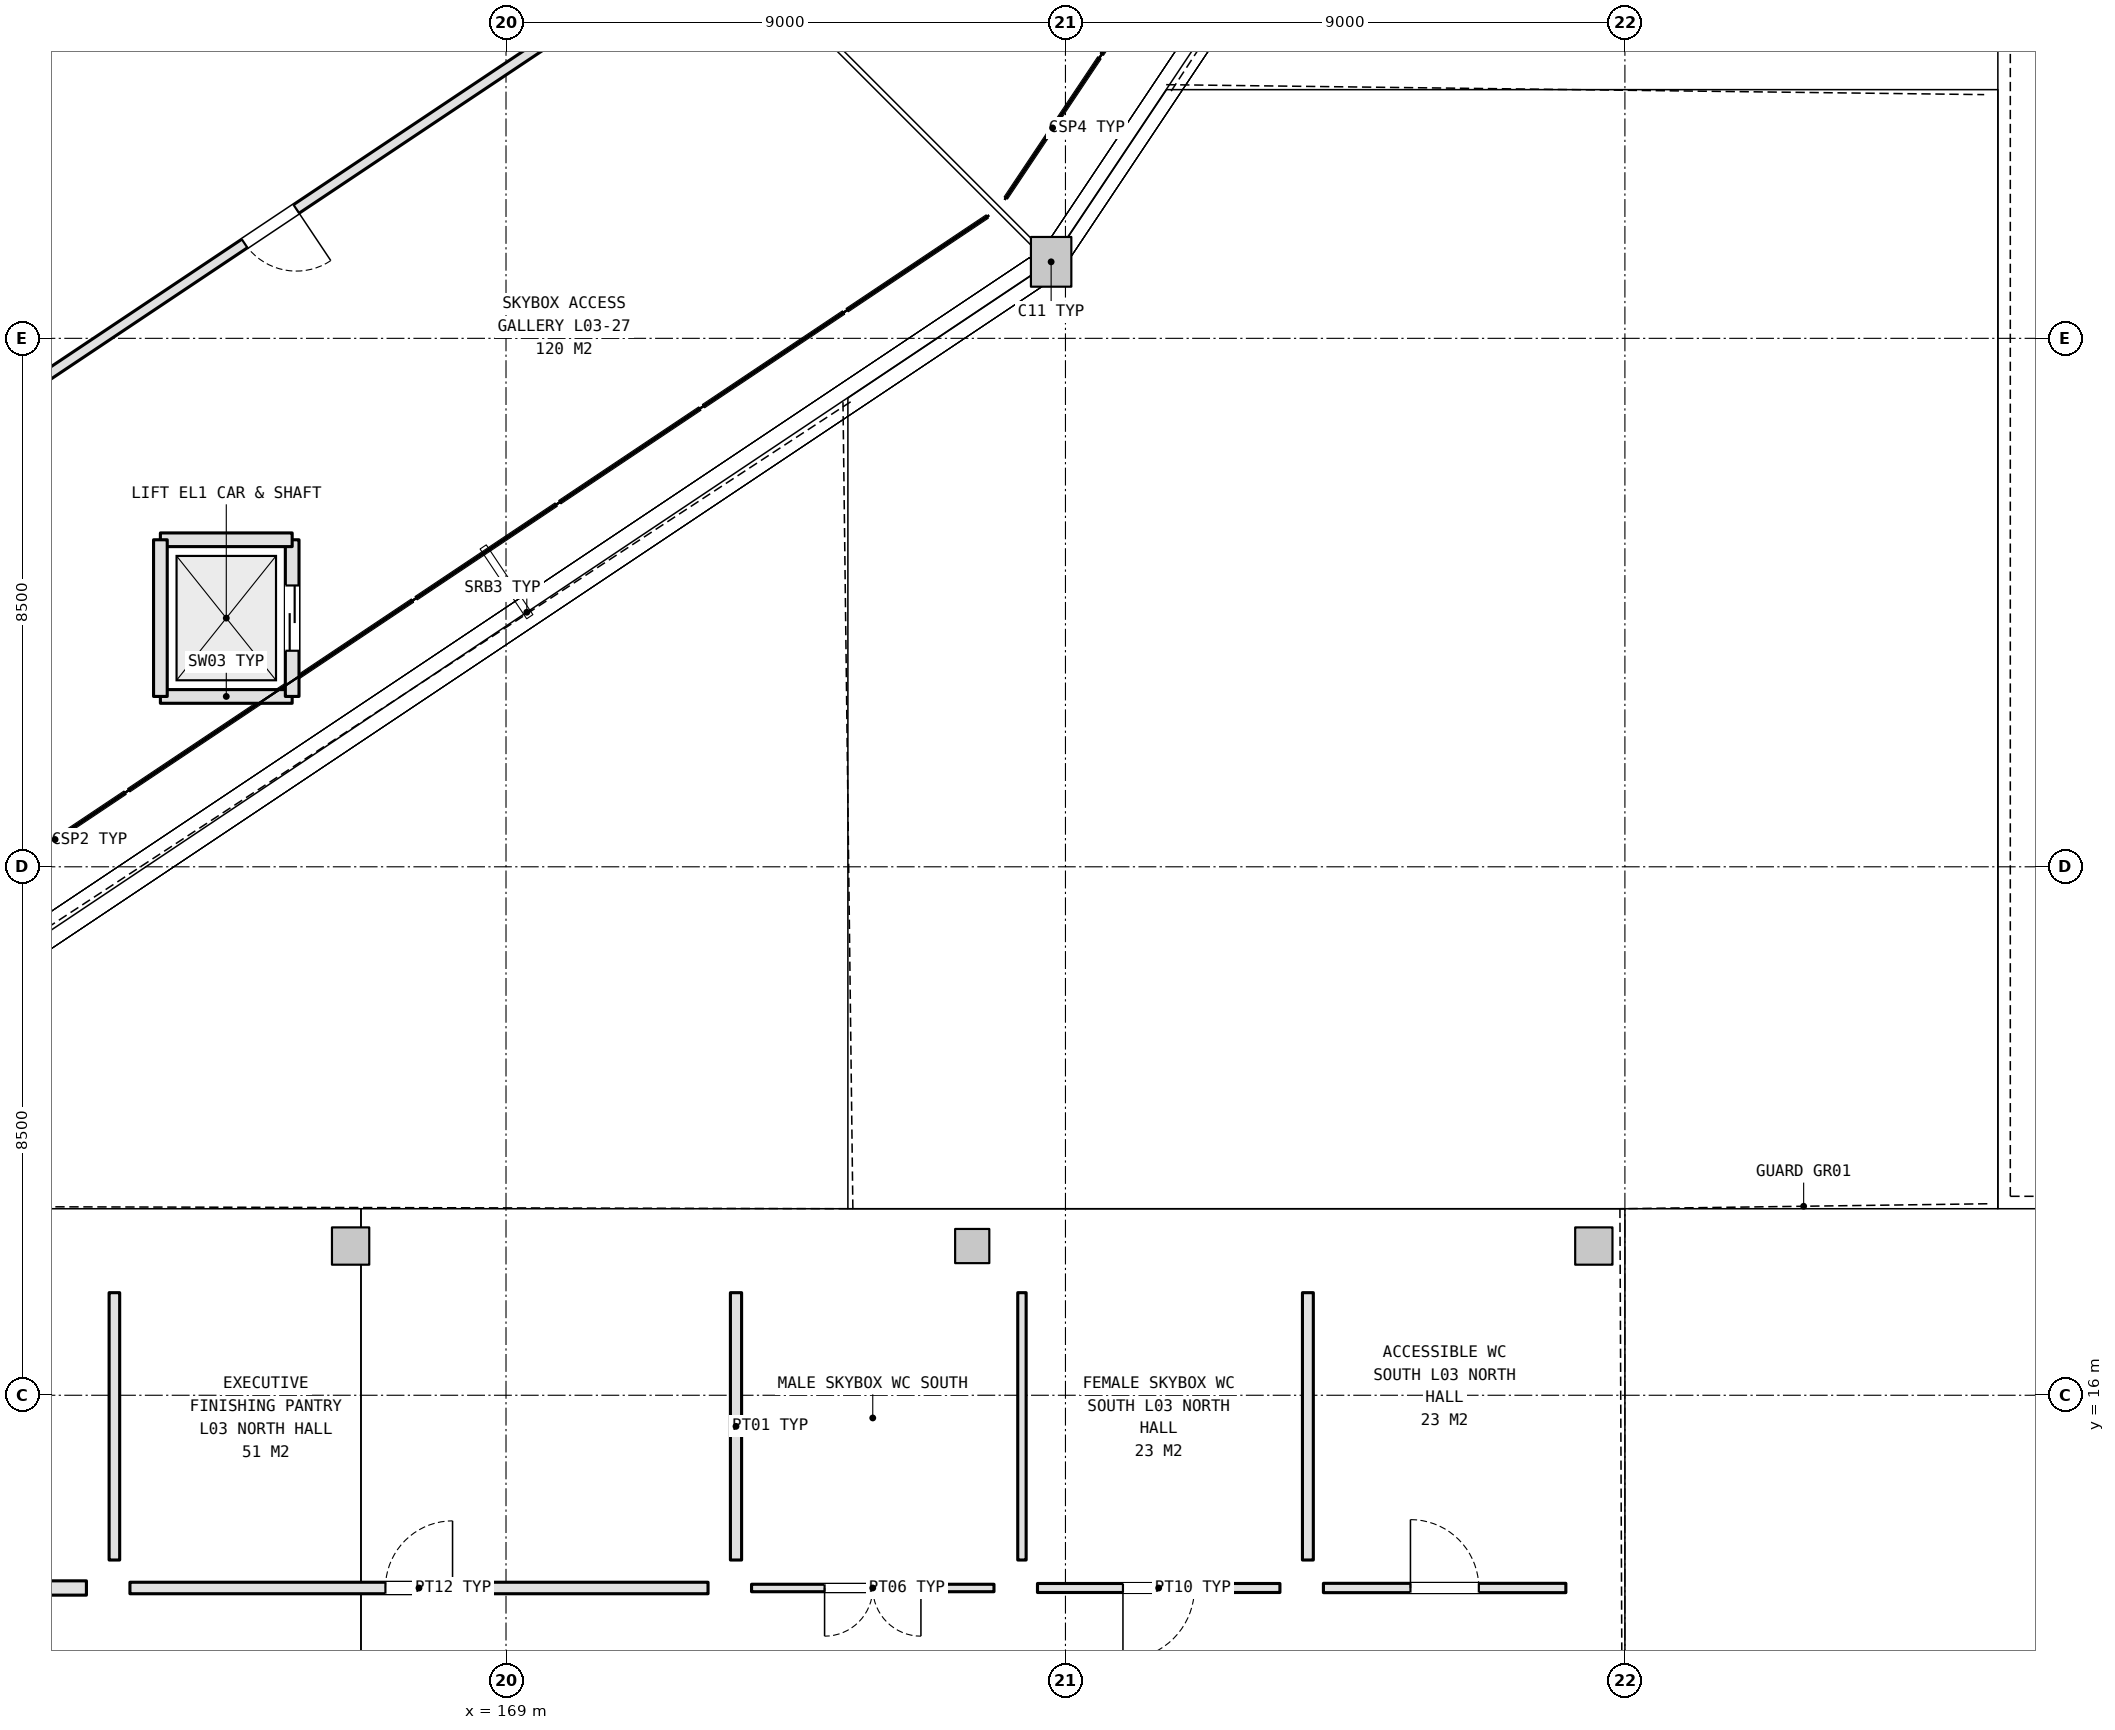
"""IFC4 building model, lengths in metres.
Left out: names, types, materials, properties, quantities, classifications, styles, units other than length and angle.
Written with IfcOpenShell. Run it as: python <this file> out.ifc"""

import sys

from ifc_helpers import new_model, si_unit, direction, frame, frame_2d, origin, origin_2d, place, context, subcontext, project, spatial, rectangle, extrude, element, fill, save


model = new_model("IFC4")
c1 = context("Model", 3, precision=1e-05, world=origin(), true_north=direction((0.0, 1.0)))
c2 = subcontext(c1, "Body", "Model", "MODEL_VIEW")
j1 = project(units=[si_unit("LENGTHUNIT", "METRE"), si_unit("PLANEANGLEUNIT", "RADIAN")], contexts=[c1])
p1 = place(None, origin())
s1 = spatial("IfcSite", under=j1, at=p1, CompositionType="ELEMENT")
p2 = place(p1, origin())
s2 = spatial("IfcBuilding", under=s1, at=p2, CompositionType="ELEMENT")
p3 = place(p2, frame((0.0, 0.0, 16.2)))
s3 = spatial("IfcBuildingStorey", under=s2, at=p3, CompositionType="ELEMENT", Elevation=16.2)
p4 = place(p3, frame((177.77, 34.23, 0.0), z_axis=(0.0, 0.0, 1.0), x_axis=(1.0, 0.0, 0.0)))
e1 = element("IfcColumn", 1, at=p4, inside=s3, PredefinedType="COLUMN", context=c2, shape_type="SweptSolid", body=[
    extrude(rectangle(XDim=0.65, YDim=0.8, at=origin_2d()), origin(), (0.0, 0.0, 1.0), 5.4),
])
p5 = place(p3, frame((166.5, 18.4, 0.0), z_axis=(0.0, 0.0, 1.0), x_axis=(1.0, 0.0, 0.0)))
e2 = element("IfcColumn", 2, at=p5, inside=s3, PredefinedType="COLUMN", context=c2, shape_type="SweptSolid", body=[
    extrude(rectangle(XDim=0.6, YDim=0.6, at=origin_2d()), origin(), (0.0, 0.0, 1.0), 5.4),
])
p6 = place(p3, frame((176.5, 18.4, 0.0), z_axis=(0.0, 0.0, 1.0), x_axis=(1.0, 0.0, 0.0)))
e3 = element("IfcColumn", 3, at=p6, inside=s3, PredefinedType="COLUMN", context=c2, shape_type="SweptSolid", body=[
    extrude(rectangle(XDim=0.55, YDim=0.55, at=origin_2d()), origin(), (0.0, 0.0, 1.0), 5.4),
])
p7 = place(p3, frame((186.5, 18.4, 0.0), z_axis=(0.0, 0.0, 1.0), x_axis=(1.0, 0.0, 0.0)))
e4 = element("IfcColumn", 4, at=p7, inside=s3, PredefinedType="COLUMN", context=c2, shape_type="SweptSolid", body=[
    extrude(rectangle(XDim=0.6, YDim=0.6, at=origin_2d()), origin(), (0.0, 0.0, 1.0), 5.4),
])
p8 = place(p3, frame((163.44, 27.24, 0.0), z_axis=(0.0, 0.0, 1.0), x_axis=(1.0, 0.0, 0.0)))
e5 = element("IfcWall", 5, at=p8, inside=s3, PredefinedType="SHEAR", context=c2, shape_type="SweptSolid", body=[
    extrude(rectangle(XDim=2.12, YDim=0.22, at=frame_2d((1.06, 0.0))), origin(), (0.0, 0.0, 1.0), 5.14),
])
p9 = place(p3, frame((165.56, 27.24, 0.0), z_axis=(0.0, 0.0, 1.0), x_axis=(0.0, 1.0, 0.0)))
e6 = element("IfcWall", 6, at=p9, inside=s3, PredefinedType="SHEAR", context=c2, shape_type="SweptSolid", body=[
    extrude(rectangle(XDim=2.52, YDim=0.22, at=frame_2d((1.26, 0.0))), origin(), (0.0, 0.0, 1.0), 5.14),
])
p10 = place(p9, frame((0.735, 0.0, 0.0)))
e7 = element("IfcOpeningElement", 7, at=p10, cuts=e6, PredefinedType="OPENING", context=c2, shape_type="SweptSolid", body=[
    extrude(rectangle(XDim=1.05, YDim=2.15, at=frame_2d((0.525, 1.075))), frame((0.0, 0.12, 0.0), z_axis=(0.0, -1.0, 0.0), x_axis=(1.0, 0.0, 0.0)), (0.0, 0.0, 1.0), 0.24),
])
p11 = place(p3, frame((165.56, 29.76, 0.0), z_axis=(0.0, 0.0, 1.0), x_axis=(-1.0, 0.0, 0.0)))
e8 = element("IfcWall", 8, at=p11, inside=s3, PredefinedType="SHEAR", context=c2, shape_type="SweptSolid", body=[
    extrude(rectangle(XDim=2.12, YDim=0.22, at=frame_2d((1.06, 0.0))), origin(), (0.0, 0.0, 1.0), 5.14),
])
p12 = place(p3, frame((163.44, 29.76, 0.0), z_axis=(0.0, 0.0, 1.0), x_axis=(0.0, -1.0, 0.0)))
e9 = element("IfcWall", 9, at=p12, inside=s3, PredefinedType="SHEAR", context=c2, shape_type="SweptSolid", body=[
    extrude(rectangle(XDim=2.52, YDim=0.22, at=frame_2d((1.26, 0.0))), origin(), (0.0, 0.0, 1.0), 5.14),
])
p13 = place(p3, frame((162.25, 12.9, 0.0), z_axis=(0.0, 0.0, 1.0), x_axis=(-1.0, 0.0, 0.0)))
e10 = element("IfcWall", 10, at=p13, inside=s3, PredefinedType="PLUMBINGWALL", context=c2, shape_type="SweptSolid", body=[
    extrude(rectangle(XDim=17.3, YDim=0.23, at=frame_2d((8.65, 0.0))), origin(), (0.0, 0.0, 1.0), 4.405),
])
p14 = place(p13, frame((8.15, 0.0, 0.0)))
e11 = element("IfcOpeningElement", 11, at=p14, cuts=e10, PredefinedType="OPENING", context=c2, shape_type="SweptSolid", body=[
    extrude(rectangle(XDim=1.0, YDim=2.15, at=frame_2d((0.5, 1.075))), frame((0.0, 0.125, 0.0), z_axis=(0.0, -1.0, 0.0), x_axis=(1.0, 0.0, 0.0)), (0.0, 0.0, 1.0), 0.25),
])
p15 = place(p3, frame((172.25, 12.9, 0.0), z_axis=(0.0, 0.0, 1.0), x_axis=(-1.0, 0.0, 0.0)))
e12 = element("IfcWall", 12, at=p15, inside=s3, PredefinedType="PARTITIONING", context=c2, shape_type="SweptSolid", body=[
    extrude(rectangle(XDim=9.3, YDim=0.185, at=frame_2d((4.65, 0.0))), origin(), (0.0, 0.0, 1.0), 4.405),
])
p16 = place(p15, frame((4.11, 0.0, 0.0)))
e13 = element("IfcOpeningElement", 13, at=p16, cuts=e12, PredefinedType="OPENING", context=c2, shape_type="SweptSolid", body=[
    extrude(rectangle(XDim=1.08, YDim=2.25, at=frame_2d((0.54, 1.125))), frame((0.0, 0.103, 0.0), z_axis=(0.0, -1.0, 0.0), x_axis=(1.0, 0.0, 0.0)), (0.0, 0.0, 1.0), 0.205),
])
p17 = place(p3, frame((162.7, 13.35, 0.0), z_axis=(0.0, 0.0, 1.0), x_axis=(0.0, 1.0, 0.0)))
e14 = element("IfcWall", 14, at=p17, inside=s3, PredefinedType="PARTITIONING", context=c2, shape_type="SweptSolid", body=[
    extrude(rectangle(XDim=4.3, YDim=0.17, at=frame_2d((2.15, 0.0))), origin(), (0.0, 0.0, 1.0), 4.605),
])
p18 = place(p3, frame((176.85, 12.9, 0.0), z_axis=(0.0, 0.0, 1.0), x_axis=(-1.0, 0.0, 0.0)))
e15 = element("IfcWall", 15, at=p18, inside=s3, PredefinedType="PARTITIONING", context=c2, shape_type="SweptSolid", body=[
    extrude(rectangle(XDim=3.9, YDim=0.12, at=frame_2d((1.95, 0.0))), origin(), (0.0, 0.0, 1.0), 4.405),
])
p19 = place(p18, frame((1.175, 0.0, 0.0)))
e16 = element("IfcOpeningElement", 16, at=p19, cuts=e15, PredefinedType="OPENING", context=c2, shape_type="SweptSolid", body=[
    extrude(rectangle(XDim=1.55, YDim=2.15, at=frame_2d((0.775, 1.075))), frame((0.0, 0.07, 0.0), z_axis=(0.0, -1.0, 0.0), x_axis=(1.0, 0.0, 0.0)), (0.0, 0.0, 1.0), 0.14),
])
p20 = place(p3, frame((172.7, 13.35, 0.0), z_axis=(0.0, 0.0, 1.0), x_axis=(0.0, 1.0, 0.0)))
e17 = element("IfcWall", 17, at=p20, inside=s3, PredefinedType="PARTITIONING", context=c2, shape_type="SweptSolid", body=[
    extrude(rectangle(XDim=4.3, YDim=0.18, at=frame_2d((2.15, 0.0))), origin(), (0.0, 0.0, 1.0), 4.605),
])
p21 = place(p3, frame((181.45, 12.9, 0.0), z_axis=(0.0, 0.0, 1.0), x_axis=(-1.0, 0.0, 0.0)))
e18 = element("IfcWall", 18, at=p21, inside=s3, PredefinedType="PARTITIONING", context=c2, shape_type="SweptSolid", body=[
    extrude(rectangle(XDim=3.9, YDim=0.145, at=frame_2d((1.95, 0.0))), origin(), (0.0, 0.0, 1.0), 5.12),
])
p22 = place(p21, frame((1.375, 0.0, 0.0)))
e19 = element("IfcOpeningElement", 19, at=p22, cuts=e18, PredefinedType="OPENING", context=c2, shape_type="SweptSolid", body=[
    extrude(rectangle(XDim=1.15, YDim=2.2, at=frame_2d((0.575, 1.1))), frame((0.0, 0.083, 0.0), z_axis=(0.0, -1.0, 0.0), x_axis=(1.0, 0.0, 0.0)), (0.0, 0.0, 1.0), 0.165),
])
p23 = place(p3, frame((177.3, 13.35, 0.0), z_axis=(0.0, 0.0, 1.0), x_axis=(0.0, 1.0, 0.0)))
e20 = element("IfcWall", 20, at=p23, inside=s3, PredefinedType="PARTITIONING", context=c2, shape_type="SweptSolid", body=[
    extrude(rectangle(XDim=4.3, YDim=0.135, at=frame_2d((2.15, 0.0))), origin(), (0.0, 0.0, 1.0), 4.605),
])
p24 = place(p3, frame((186.05, 12.9, 0.0), z_axis=(0.0, 0.0, 1.0), x_axis=(-1.0, 0.0, 0.0)))
e21 = element("IfcWall", 21, at=p24, inside=s3, PredefinedType="PARTITIONING", context=c2, shape_type="SweptSolid", body=[
    extrude(rectangle(XDim=3.9, YDim=0.15, at=frame_2d((1.95, 0.0))), origin(), (0.0, 0.0, 1.0), 5.12),
])
p25 = place(p24, frame((1.4, 0.0, 0.0)))
e22 = element("IfcOpeningElement", 22, at=p25, cuts=e21, PredefinedType="OPENING", context=c2, shape_type="SweptSolid", body=[
    extrude(rectangle(XDim=1.1, YDim=2.15, at=frame_2d((0.55, 1.075))), frame((0.0, 0.085, 0.0), z_axis=(0.0, -1.0, 0.0), x_axis=(1.0, 0.0, 0.0)), (0.0, 0.0, 1.0), 0.17),
])
p26 = place(p3, frame((181.9, 13.35, 0.0), z_axis=(0.0, 0.0, 1.0), x_axis=(0.0, 1.0, 0.0)))
e23 = element("IfcWall", 23, at=p26, inside=s3, PredefinedType="PARTITIONING", context=c2, shape_type="SweptSolid", body=[
    extrude(rectangle(XDim=4.3, YDim=0.175, at=frame_2d((2.15, 0.0))), origin(), (0.0, 0.0, 1.0), 4.605),
])
p27 = place(p3, frame((172.188, 39.466, 0.0), z_axis=(0.0, 0.0, 1.0), x_axis=(-0.831467963177, -0.555572701103, 0.0)))
e24 = element("IfcWall", 24, at=p27, inside=s3, PredefinedType="PARTITIONING", context=c2, shape_type="SweptSolid", body=[
    extrude(rectangle(XDim=16.783, YDim=0.165, at=frame_2d((8.392, 0.0))), origin(), (0.0, 0.0, 1.0), 4.345),
])
p28 = place(p27, frame((7.892, 0.0, 0.0)))
e25 = element("IfcOpeningElement", 25, at=p28, cuts=e24, PredefinedType="OPENING", context=c2, shape_type="SweptSolid", body=[
    extrude(rectangle(XDim=1.0, YDim=2.15, at=frame_2d((0.5, 1.075))), frame((0.0, 0.093, 0.0), z_axis=(0.0, -1.0, 0.0), x_axis=(1.0, 0.0, 0.0)), (0.0, 0.0, 1.0), 0.185),
])
p29 = place(p10, origin())
e26 = element("IfcDoor", 26, at=p29, inside=s3, OperationType="DOUBLE_DOOR_SLIDING", PredefinedType="DOOR", context=c2, shape_type="SweptSolid", body=[
    extrude(rectangle(XDim=1.05, YDim=2.15, at=frame_2d((0.525, 1.075))), frame((0.0, 0.025, 0.0), z_axis=(0.0, -1.0, 0.0), x_axis=(1.0, 0.0, 0.0)), (0.0, 0.0, 1.0), 0.05),
])
fill(e7, e26)
p30 = place(p16, frame((1.08, 0.0, 0.0), z_axis=(0.0, 0.0, 1.0), x_axis=(-1.0, 0.0, 0.0)))
e27 = element("IfcDoor", 27, at=p30, inside=s3, OperationType="SINGLE_SWING_LEFT", PredefinedType="DOOR", context=c2, shape_type="SweptSolid", body=[
    extrude(rectangle(XDim=1.08, YDim=2.25, at=frame_2d((0.54, 1.125))), frame((0.0, 0.025, 0.0), z_axis=(0.0, -1.0, 0.0), x_axis=(1.0, 0.0, 0.0)), (0.0, 0.0, 1.0), 0.05),
])
fill(e13, e27)
p31 = place(p19, origin())
e28 = element("IfcDoor", 28, at=p31, inside=s3, OperationType="DOUBLE_DOOR_SINGLE_SWING", PredefinedType="DOOR", context=c2, shape_type="SweptSolid", body=[
    extrude(rectangle(XDim=1.55, YDim=2.15, at=frame_2d((0.775, 1.075))), frame((0.0, 0.025, 0.0), z_axis=(0.0, -1.0, 0.0), x_axis=(1.0, 0.0, 0.0)), (0.0, 0.0, 1.0), 0.05),
])
fill(e16, e28)
p32 = place(p22, origin())
e29 = element("IfcDoor", 29, at=p32, inside=s3, OperationType="SINGLE_SWING_RIGHT", PredefinedType="DOOR", context=c2, shape_type="SweptSolid", body=[
    extrude(rectangle(XDim=1.15, YDim=2.2, at=frame_2d((0.575, 1.1))), frame((0.0, 0.025, 0.0), z_axis=(0.0, -1.0, 0.0), x_axis=(1.0, 0.0, 0.0)), (0.0, 0.0, 1.0), 0.05),
])
fill(e19, e29)
p33 = place(p25, frame((1.1, 0.0, 0.0), z_axis=(0.0, 0.0, 1.0), x_axis=(-1.0, 0.0, 0.0)))
e30 = element("IfcDoor", 30, at=p33, inside=s3, OperationType="SINGLE_SWING_RIGHT", PredefinedType="DOOR", context=c2, shape_type="SweptSolid", body=[
    extrude(rectangle(XDim=1.1, YDim=2.15, at=frame_2d((0.55, 1.075))), frame((0.0, 0.025, 0.0), z_axis=(0.0, -1.0, 0.0), x_axis=(1.0, 0.0, 0.0)), (0.0, 0.0, 1.0), 0.05),
])
fill(e22, e30)
p34 = place(p28, origin())
e31 = element("IfcDoor", 31, at=p34, inside=s3, OperationType="SINGLE_SWING_LEFT", PredefinedType="DOOR", context=c2, shape_type="SweptSolid", body=[
    extrude(rectangle(XDim=1.0, YDim=2.15, at=frame_2d((0.5, 1.075))), frame((0.0, 0.025, 0.0), z_axis=(0.0, -1.0, 0.0), x_axis=(1.0, 0.0, 0.0)), (0.0, 0.0, 1.0), 0.05),
])
fill(e25, e31)
save(model, sys.argv[1])
